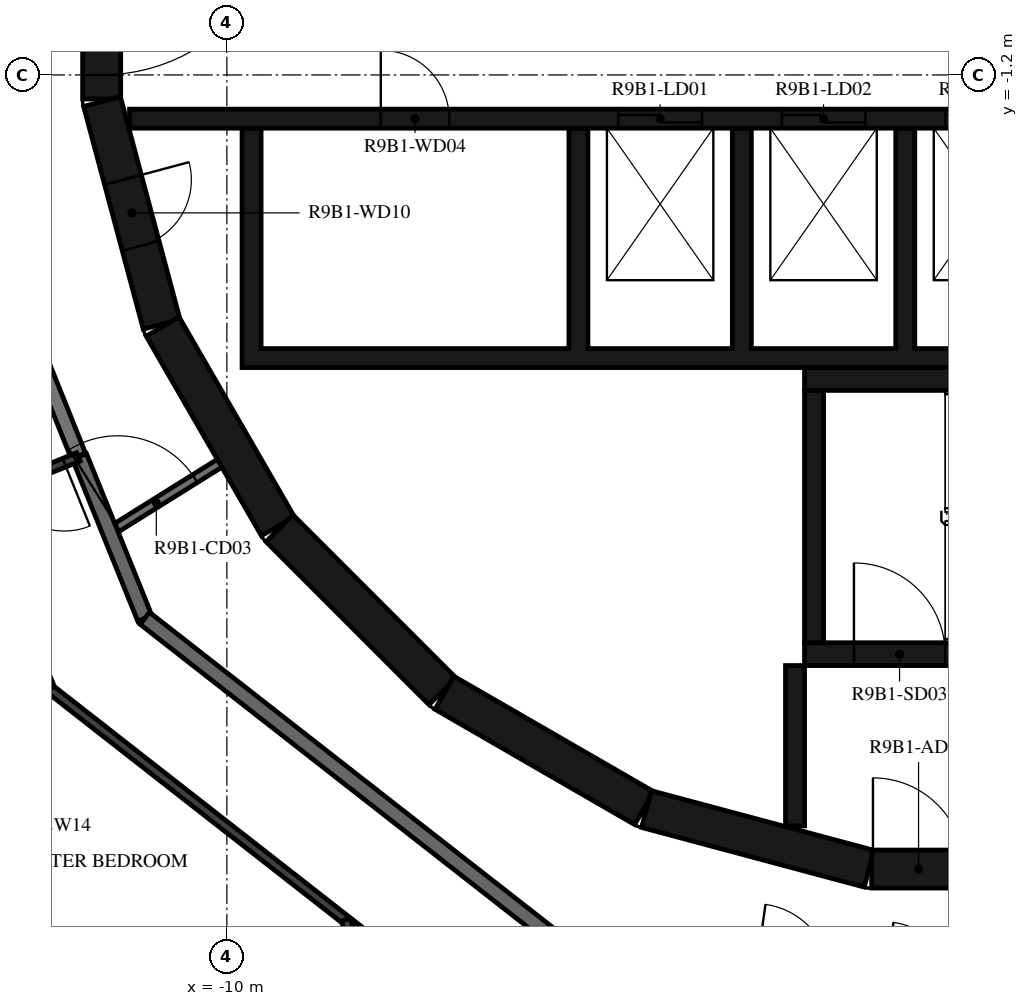
"""IFC4 building model, lengths in metres.
Left out: names, types, materials, properties, quantities, classifications, styles, units other than length and angle.
Written with IfcOpenShell. Run it as: python <this file> out.ifc"""

import sys

from ifc_helpers import new_model, si_unit, direction, frame, frame_2d, origin, place, context, subcontext, project, spatial, polyline, rectangle, outline, extrude, element, fill, save


model = new_model("IFC4")
c1 = context("Model", 3, precision=1e-05, world=origin(), true_north=direction((0.0, 1.0)))
c2 = subcontext(c1, "Body", "Model", "MODEL_VIEW")
j1 = project(units=[si_unit("LENGTHUNIT", "METRE"), si_unit("PLANEANGLEUNIT", "RADIAN")], contexts=[c1])
p1 = place(None, origin())
s1 = spatial("IfcSite", under=j1, at=p1, CompositionType="ELEMENT")
p2 = place(p1, origin())
s2 = spatial("IfcBuilding", under=s1, at=p2, CompositionType="ELEMENT")
p3 = place(p2, frame((0.0, 0.0, 350.5)))
s3 = spatial("IfcBuildingStorey", under=s2, at=p3, CompositionType="ELEMENT", Elevation=350.5)
p4 = place(p3, frame((-11.647, 1.516, 0.0), z_axis=(0.0, 0.0, 1.0), x_axis=(0.0, -1.0, 0.0)))
e1 = element("IfcWall", 1, at=p4, inside=s3, PredefinedType="SHEAR", context=c2, shape_type="SweptSolid", body=[
    extrude(rectangle(XDim=3.033, YDim=0.5, at=frame_2d((1.516, 0.0))), origin(), (0.0, 0.0, 1.0), 3.12),
])
p5 = place(p4, frame((0.316, 0.0, 0.0)))
e2 = element("IfcOpeningElement", 2, at=p5, cuts=e1, PredefinedType="OPENING", context=c2, shape_type="SweptSolid", body=[
    extrude(rectangle(XDim=2.4, YDim=2.1, at=frame_2d((1.2, 1.05))), frame((0.0, 0.26, 0.0), z_axis=(0.0, -1.0, 0.0), x_axis=(1.0, 0.0, 0.0)), (0.0, 0.0, 1.0), 0.52),
])
p6 = place(p3, frame((-11.643, -1.55, 0.0), z_axis=(0.0, 0.0, 1.0), x_axis=(0.258734743916, -0.965948410781, 0.0)))
e3 = element("IfcWall", 3, at=p6, inside=s3, PredefinedType="SHEAR", context=c2, shape_type="SweptSolid", body=[
    extrude(rectangle(XDim=3.033, YDim=0.5, at=frame_2d((1.516, 0.0))), origin(), (0.0, 0.0, 1.0), 3.12),
])
p7 = place(p6, frame((1.066, 0.0, 0.0)))
e4 = element("IfcOpeningElement", 4, at=p7, cuts=e3, PredefinedType="OPENING", context=c2, shape_type="SweptSolid", body=[
    extrude(rectangle(XDim=0.9, YDim=2.1, at=frame_2d((0.45, 1.05))), frame((0.0, 0.26, 0.0), z_axis=(0.0, -1.0, 0.0), x_axis=(1.0, 0.0, 0.0)), (0.0, 0.0, 1.0), 0.52),
])
p8 = place(p3, frame((-10.845, -4.51, 0.0), z_axis=(0.0, 0.0, 1.0), x_axis=(0.500087131594, -0.865975092491, 0.0)))
e5 = element("IfcWall", 5, at=p8, inside=s3, PredefinedType="SHEAR", context=c2, shape_type="SweptSolid", body=[
    extrude(rectangle(XDim=3.033, YDim=0.5, at=frame_2d((1.516, 0.0))), origin(), (0.0, 0.0, 1.0), 3.12),
])
p9 = place(p3, frame((-9.308, -7.164, 0.0), z_axis=(0.0, 0.0, 1.0), x_axis=(0.707106781187, -0.707106781187, 0.0)))
e6 = element("IfcWall", 6, at=p9, inside=s3, PredefinedType="SHEAR", context=c2, shape_type="SweptSolid", body=[
    extrude(rectangle(XDim=3.032, YDim=0.5, at=frame_2d((1.516, 0.0))), origin(), (0.0, 0.0, 1.0), 3.12),
])
for number, where, z_axis, x_axis in (
    (7, (-7.137, -9.329, 0.0), (0.0, 0.0, 1.0), (0.866, -0.5, 0.0)),
    (8, (-4.479, -10.858, 0.0), (0.0, 0.0, 1.0), (0.966, -0.259, 0.0)),
):
    element("IfcWall", number, at=place(p3, frame(where, z_axis=z_axis, x_axis=x_axis)), inside=s3, PredefinedType="SHEAR", context=c2, shape_type="SweptSolid", body=[
        extrude(rectangle(XDim=3.033, YDim=0.5, at=frame_2d((1.516, 0.0))), origin(), (0.0, 0.0, 1.0), 3.12),
    ])
p10 = place(p3, frame((-1.516, -11.647, 0.0), z_axis=(0.0, 0.0, 1.0), x_axis=(1.0, 0.0, 0.0)))
e9 = element("IfcWall", 9, at=p10, inside=s3, PredefinedType="SHEAR", context=c2, shape_type="SweptSolid", body=[
    extrude(rectangle(XDim=3.033, YDim=0.5, at=frame_2d((1.516, 0.0))), origin(), (0.0, 0.0, 1.0), 3.12),
])
p11 = place(p10, frame((0.016, 0.0, 0.0)))
e10 = element("IfcOpeningElement", 10, at=p11, cuts=e9, PredefinedType="OPENING", context=c2, shape_type="SweptSolid", body=[
    extrude(rectangle(XDim=1.2, YDim=2.1, at=frame_2d((0.6, 1.05))), frame((0.0, 0.26, 0.0), z_axis=(0.0, -1.0, 0.0), x_axis=(1.0, 0.0, 0.0)), (0.0, 0.0, 1.0), 0.52),
])
p12 = place(p3, frame((-2.275, -8.67, 0.0), z_axis=(0.0, 0.0, 1.0), x_axis=(0.0, 1.0, 0.0)))
e11 = element("IfcWall", 11, at=p12, inside=s3, PredefinedType="SHEAR", context=c2, shape_type="SweptSolid", body=[
    extrude(rectangle(XDim=3.32, YDim=0.25, at=frame_2d((1.66, 0.0))), origin(), (0.0, 0.0, 1.0), 3.12),
])
p13 = place(p3, frame((-2.4, -5.2, 0.0), z_axis=(0.0, 0.0, 1.0), x_axis=(1.0, 0.0, 0.0)))
e12 = element("IfcWall", 12, at=p13, inside=s3, PredefinedType="SHEAR", context=c2, shape_type="SweptSolid", body=[
    extrude(rectangle(XDim=7.05, YDim=0.3, at=frame_2d((3.525, 0.0))), origin(), (0.0, 0.0, 1.0), 3.12),
])
p14 = place(p3, frame((-2.4, -8.82, 0.0), z_axis=(0.0, 0.0, 1.0), x_axis=(1.0, 0.0, 0.0)))
e13 = element("IfcWall", 13, at=p14, inside=s3, PredefinedType="SHEAR", context=c2, shape_type="SweptSolid", body=[
    extrude(rectangle(XDim=2.5, YDim=0.3, at=frame_2d((1.25, 0.0))), origin(), (0.0, 0.0, 1.0), 3.12),
])
p15 = place(p14, frame((0.65, 0.0, 0.0)))
e14 = element("IfcOpeningElement", 14, at=p15, cuts=e13, PredefinedType="OPENING", context=c2, shape_type="SweptSolid", body=[
    extrude(rectangle(XDim=1.2, YDim=2.1, at=frame_2d((0.6, 1.05))), frame((0.0, 0.16, 0.0), z_axis=(0.0, -1.0, 0.0), x_axis=(1.0, 0.0, 0.0)), (0.0, 0.0, 1.0), 0.32),
])
p16 = place(p3, frame((-2.525, -8.97, 0.0), z_axis=(0.0, 0.0, 1.0), x_axis=(0.0, -1.0, 0.0)))
e15 = element("IfcWall", 15, at=p16, inside=s3, PredefinedType="SHEAR", context=c2, shape_type="SweptSolid", body=[
    extrude(rectangle(XDim=2.11, YDim=0.25, at=frame_2d((1.055, 0.0))), origin(), (0.0, 0.0, 1.0), 3.12),
])
p17 = place(p3, origin())
e16 = element("IfcWall", 16, at=p17, inside=s3, PredefinedType="SHEAR", context=c2, shape_type="SweptSolid", body=[
    extrude(outline(polyline([(9.8, -5.05), (9.8, -4.8), (9.8, -1.9), (9.55, -1.9), (9.55, -4.8), (7.65, -4.8), (7.65, -1.9), (7.4, -1.9), (7.4, -4.8), (5.5, -4.8), (5.5, -1.9), (5.25, -1.9), (5.25, -4.8), (3.35, -4.8), (3.35, -1.9), (3.1, -1.9), (3.1, -4.8), (1.2, -4.8), (1.2, -1.9), (0.95, -1.9), (0.95, -4.8), (-0.95, -4.8), (-0.95, -1.9), (-1.2, -1.9), (-1.2, -4.8), (-3.1, -4.8), (-3.1, -1.9), (-3.35, -1.9), (-3.35, -4.8), (-5.25, -4.8), (-5.25, -1.9), (-5.5, -1.9), (-5.5, -4.8), (-9.55, -4.8), (-9.55, -1.9), (-9.8, -1.9), (-9.8, -4.8), (-9.8, -5.05), (9.8, -5.05)])), origin(), (0.0, 0.0, 1.0), 3.12),
])
p18 = place(p3, frame((-11.28, -1.775, 0.0), z_axis=(0.0, 0.0, 1.0), x_axis=(1.0, 0.0, 0.0)))
e17 = element("IfcWall", 17, at=p18, inside=s3, PredefinedType="SHEAR", context=c2, shape_type="SweptSolid", body=[
    extrude(rectangle(XDim=14.38, YDim=0.25, at=frame_2d((7.19, 0.0))), origin(), (0.0, 0.0, 1.0), 3.12),
])
p19 = place(p18, frame((6.43, 0.0, 0.0)))
e18 = element("IfcOpeningElement", 18, at=p19, cuts=e17, PredefinedType="OPENING", context=c2, shape_type="SweptSolid", body=[
    extrude(rectangle(XDim=1.1, YDim=2.1, at=frame_2d((0.55, 1.05))), frame((0.0, 0.135, 0.0), z_axis=(0.0, -1.0, 0.0), x_axis=(1.0, 0.0, 0.0)), (0.0, 0.0, 1.0), 0.27),
])
p20 = place(p18, frame((8.58, 0.0, 0.0)))
e19 = element("IfcOpeningElement", 19, at=p20, cuts=e17, PredefinedType="OPENING", context=c2, shape_type="SweptSolid", body=[
    extrude(rectangle(XDim=1.1, YDim=2.1, at=frame_2d((0.55, 1.05))), frame((0.0, 0.135, 0.0), z_axis=(0.0, -1.0, 0.0), x_axis=(1.0, 0.0, 0.0)), (0.0, 0.0, 1.0), 0.27),
])
p21 = place(p18, frame((10.73, 0.0, 0.0)))
e20 = element("IfcOpeningElement", 20, at=p21, cuts=e17, PredefinedType="OPENING", context=c2, shape_type="SweptSolid", body=[
    extrude(rectangle(XDim=1.1, YDim=2.1, at=frame_2d((0.55, 1.05))), frame((0.0, 0.135, 0.0), z_axis=(0.0, -1.0, 0.0), x_axis=(1.0, 0.0, 0.0)), (0.0, 0.0, 1.0), 0.27),
])
p22 = place(p18, frame((3.305, 0.0, 0.0)))
e21 = element("IfcOpeningElement", 21, at=p22, cuts=e17, PredefinedType="OPENING", context=c2, shape_type="SweptSolid", body=[
    extrude(rectangle(XDim=0.9, YDim=2.1, at=frame_2d((0.45, 1.05))), frame((0.0, 0.135, 0.0), z_axis=(0.0, -1.0, 0.0), x_axis=(1.0, 0.0, 0.0)), (0.0, 0.0, 1.0), 0.27),
])
p23 = place(p18, frame((12.98, 0.0, 0.0)))
e22 = element("IfcOpeningElement", 22, at=p23, cuts=e17, PredefinedType="OPENING", context=c2, shape_type="SweptSolid", body=[
    extrude(rectangle(XDim=0.9, YDim=2.1, at=frame_2d((0.45, 1.05))), frame((0.0, 0.135, 0.0), z_axis=(0.0, -1.0, 0.0), x_axis=(1.0, 0.0, 0.0)), (0.0, 0.0, 1.0), 0.27),
])
p24 = place(p3, frame((-11.539, -7.21, 0.0), z_axis=(0.0, 0.0, 1.0), x_axis=(0.848103039868, 0.529831325769, 0.0)))
e23 = element("IfcWall", 23, at=p24, inside=s3, PredefinedType="PARTITIONING", context=c2, shape_type="SweptSolid", body=[
    extrude(rectangle(XDim=1.702, YDim=0.12, at=frame_2d((0.851, 0.0))), origin(), (0.0, 0.0, 1.0), 3.12),
])
p25 = place(p24, frame((0.12, 0.0, 0.0)))
e24 = element("IfcOpeningElement", 24, at=p25, cuts=e23, PredefinedType="OPENING", context=c2, shape_type="SweptSolid", body=[
    extrude(rectangle(XDim=1.2, YDim=2.1, at=frame_2d((0.6, 1.05))), frame((0.0, 0.07, 0.0), z_axis=(0.0, -1.0, 0.0), x_axis=(1.0, 0.0, 0.0)), (0.0, 0.0, 1.0), 0.14),
])
p26 = place(p3, frame((-13.769, -1.691, 0.0), z_axis=(0.0, 0.0, 1.0), x_axis=(0.372720094028, -0.927943819155, 0.0)))
e25 = element("IfcWall", 25, at=p26, inside=s3, PredefinedType="STANDARD", context=c2, shape_type="SweptSolid", body=[
    extrude(rectangle(XDim=4.875, YDim=0.2, at=frame_2d((2.438, 0.0))), origin(), (0.0, 0.0, 1.0), 3.12),
])
p27 = place(p3, frame((-11.939, -6.22, 0.0), z_axis=(0.0, 0.0, 1.0), x_axis=(0.374651128394, -0.927165860024, 0.0)))
e26 = element("IfcWall", 26, at=p27, inside=s3, PredefinedType="STANDARD", context=c2, shape_type="SweptSolid", body=[
    extrude(rectangle(XDim=2.296, YDim=0.2, at=frame_2d((1.148, 0.0))), origin(), (0.0, 0.0, 1.0), 3.12),
])
p28 = place(p3, frame((-11.079, -8.349, 0.0), z_axis=(0.0, 0.0, 1.0), x_axis=(0.78800478687, -0.615669112324, 0.0)))
e27 = element("IfcWall", 27, at=p28, inside=s3, PredefinedType="STANDARD", context=c2, shape_type="SweptSolid", body=[
    extrude(rectangle(XDim=7.181, YDim=0.2, at=frame_2d((3.591, 0.0))), origin(), (0.0, 0.0, 1.0), 3.12),
])
p29 = place(p3, frame((-11.953, -6.225, 0.0), z_axis=(0.0, 0.0, 1.0), x_axis=(-0.927144096717, -0.374704982518, 0.0)))
e28 = element("IfcWall", 28, at=p29, inside=s3, PredefinedType="PARTITIONING", context=c2, shape_type="SweptSolid", body=[
    extrude(rectangle(XDim=1.485, YDim=0.12, at=frame_2d((0.742, 0.0))), origin(), (0.0, 0.0, 1.0), 3.12),
])
p30 = place(p29, frame((0.2, 0.0, 0.0)))
e29 = element("IfcOpeningElement", 29, at=p30, cuts=e28, PredefinedType="OPENING", context=c2, shape_type="SweptSolid", body=[
    extrude(rectangle(XDim=0.9, YDim=2.1, at=frame_2d((0.45, 1.05))), frame((0.0, 0.07, 0.0), z_axis=(0.0, -1.0, 0.0), x_axis=(1.0, 0.0, 0.0)), (0.0, 0.0, 1.0), 0.14),
])
p31 = place(p3, frame((-13.33, -6.782, 0.0), z_axis=(0.0, 0.0, 1.0), x_axis=(0.374602180132, -0.927185637637, 0.0)))
e30 = element("IfcWall", 30, at=p31, inside=s3, PredefinedType="PARTITIONING", context=c2, shape_type="SweptSolid", body=[
    extrude(rectangle(XDim=2.698, YDim=0.12, at=frame_2d((1.349, 0.0))), origin(), (0.0, 0.0, 1.0), 3.12),
])
p32 = place(p3, frame((-12.319, -9.283, 0.0), z_axis=(0.0, 0.0, 1.0), x_axis=(0.788000268464, -0.61567489546, 0.0)))
e31 = element("IfcWall", 31, at=p32, inside=s3, PredefinedType="PARTITIONING", context=c2, shape_type="SweptSolid", body=[
    extrude(rectangle(XDim=7.985, YDim=0.12, at=frame_2d((3.992, 0.0))), origin(), (0.0, 0.0, 1.0), 3.12),
])
p33 = place(p32, frame((6.423, 0.0, 0.0)))
e32 = element("IfcOpeningElement", 32, at=p33, cuts=e31, PredefinedType="OPENING", context=c2, shape_type="SweptSolid", body=[
    extrude(rectangle(XDim=0.9, YDim=2.1, at=frame_2d((0.45, 1.05))), frame((0.0, 0.07, 0.0), z_axis=(0.0, -1.0, 0.0), x_axis=(1.0, 0.0, 0.0)), (0.0, 0.0, 1.0), 0.14),
])
p34 = place(p3, frame((-5.894, -18.616, 0.0), z_axis=(0.0, 0.0, 1.0), x_axis=(-0.374596683143, 0.927187858515, 0.0)))
e33 = element("IfcWall", 33, at=p34, inside=s3, PredefinedType="PARTITIONING", context=c2, shape_type="SweptSolid", body=[
    extrude(rectangle(XDim=6.796, YDim=0.12, at=frame_2d((3.398, 0.0))), origin(), (0.0, 0.0, 1.0), 3.12),
])
p35 = place(p34, frame((2.822, 0.0, 0.0)))
e34 = element("IfcOpeningElement", 34, at=p35, cuts=e33, PredefinedType="OPENING", context=c2, shape_type="SweptSolid", body=[
    extrude(rectangle(XDim=0.9, YDim=2.1, at=frame_2d((0.45, 1.05))), frame((0.0, 0.07, 0.0), z_axis=(0.0, -1.0, 0.0), x_axis=(1.0, 0.0, 0.0)), (0.0, 0.0, 1.0), 0.14),
])
p36 = place(p15, origin())
e35 = element("IfcDoor", 35, at=p36, inside=s3, OperationType="SINGLE_SWING_LEFT", PredefinedType="DOOR", context=c2, shape_type="SweptSolid", body=[
    extrude(rectangle(XDim=1.2, YDim=2.1, at=frame_2d((0.6, 1.05))), frame((0.0, 0.025, 0.0), z_axis=(0.0, -1.0, 0.0), x_axis=(1.0, 0.0, 0.0)), (0.0, 0.0, 1.0), 0.05),
])
fill(e14, e35)
p37 = place(p11, origin())
e36 = element("IfcDoor", 36, at=p37, inside=s3, OperationType="SINGLE_SWING_RIGHT", PredefinedType="DOOR", context=c2, shape_type="SweptSolid", body=[
    extrude(rectangle(XDim=1.2, YDim=2.1, at=frame_2d((0.6, 1.05))), frame((0.0, 0.025, 0.0), z_axis=(0.0, -1.0, 0.0), x_axis=(1.0, 0.0, 0.0)), (0.0, 0.0, 1.0), 0.05),
])
fill(e10, e36)
p38 = place(p5, origin())
e37 = element("IfcDoor", 37, at=p38, inside=s3, OperationType="DOUBLE_DOOR_SINGLE_SWING", PredefinedType="DOOR", context=c2, shape_type="SweptSolid", body=[
    extrude(rectangle(XDim=2.4, YDim=2.1, at=frame_2d((1.2, 1.05))), frame((0.0, 0.025, 0.0), z_axis=(0.0, -1.0, 0.0), x_axis=(1.0, 0.0, 0.0)), (0.0, 0.0, 1.0), 0.05),
])
fill(e2, e37)
p39 = place(p19, origin())
e38 = element("IfcDoor", 38, at=p39, inside=s3, OperationType="DOUBLE_DOOR_SLIDING", PredefinedType="DOOR", context=c2, shape_type="SweptSolid", body=[
    extrude(rectangle(XDim=1.1, YDim=2.1, at=frame_2d((0.55, 1.05))), frame((0.0, 0.025, 0.0), z_axis=(0.0, -1.0, 0.0), x_axis=(1.0, 0.0, 0.0)), (0.0, 0.0, 1.0), 0.05),
])
fill(e18, e38)
p40 = place(p20, origin())
e39 = element("IfcDoor", 39, at=p40, inside=s3, OperationType="DOUBLE_DOOR_SLIDING", PredefinedType="DOOR", context=c2, shape_type="SweptSolid", body=[
    extrude(rectangle(XDim=1.1, YDim=2.1, at=frame_2d((0.55, 1.05))), frame((0.0, 0.025, 0.0), z_axis=(0.0, -1.0, 0.0), x_axis=(1.0, 0.0, 0.0)), (0.0, 0.0, 1.0), 0.05),
])
fill(e19, e39)
p41 = place(p21, origin())
e40 = element("IfcDoor", 40, at=p41, inside=s3, OperationType="DOUBLE_DOOR_SLIDING", PredefinedType="DOOR", context=c2, shape_type="SweptSolid", body=[
    extrude(rectangle(XDim=1.1, YDim=2.1, at=frame_2d((0.55, 1.05))), frame((0.0, 0.025, 0.0), z_axis=(0.0, -1.0, 0.0), x_axis=(1.0, 0.0, 0.0)), (0.0, 0.0, 1.0), 0.05),
])
fill(e20, e40)
p42 = place(p22, origin())
e41 = element("IfcDoor", 41, at=p42, inside=s3, OperationType="SINGLE_SWING_RIGHT", PredefinedType="DOOR", context=c2, shape_type="SweptSolid", body=[
    extrude(rectangle(XDim=0.9, YDim=2.1, at=frame_2d((0.45, 1.05))), frame((0.0, 0.025, 0.0), z_axis=(0.0, -1.0, 0.0), x_axis=(1.0, 0.0, 0.0)), (0.0, 0.0, 1.0), 0.05),
])
fill(e21, e41)
p43 = place(p7, origin())
e42 = element("IfcDoor", 42, at=p43, inside=s3, OperationType="SINGLE_SWING_RIGHT", PredefinedType="DOOR", context=c2, shape_type="SweptSolid", body=[
    extrude(rectangle(XDim=0.9, YDim=2.1, at=frame_2d((0.45, 1.05))), frame((0.0, 0.025, 0.0), z_axis=(0.0, -1.0, 0.0), x_axis=(1.0, 0.0, 0.0)), (0.0, 0.0, 1.0), 0.05),
])
fill(e4, e42)
p44 = place(p30, origin())
e43 = element("IfcDoor", 43, at=p44, inside=s3, OperationType="SINGLE_SWING_LEFT", PredefinedType="DOOR", context=c2, shape_type="SweptSolid", body=[
    extrude(rectangle(XDim=0.9, YDim=2.1, at=frame_2d((0.45, 1.05))), frame((0.0, 0.025, 0.0), z_axis=(0.0, -1.0, 0.0), x_axis=(1.0, 0.0, 0.0)), (0.0, 0.0, 1.0), 0.05),
])
fill(e29, e43)
p45 = place(p25, origin())
e44 = element("IfcDoor", 44, at=p45, inside=s3, OperationType="DOUBLE_DOOR_SINGLE_SWING", PredefinedType="DOOR", context=c2, shape_type="SweptSolid", body=[
    extrude(rectangle(XDim=1.2, YDim=2.1, at=frame_2d((0.6, 1.05))), frame((0.0, 0.025, 0.0), z_axis=(0.0, -1.0, 0.0), x_axis=(1.0, 0.0, 0.0)), (0.0, 0.0, 1.0), 0.05),
])
fill(e24, e44)
save(model, sys.argv[1])
